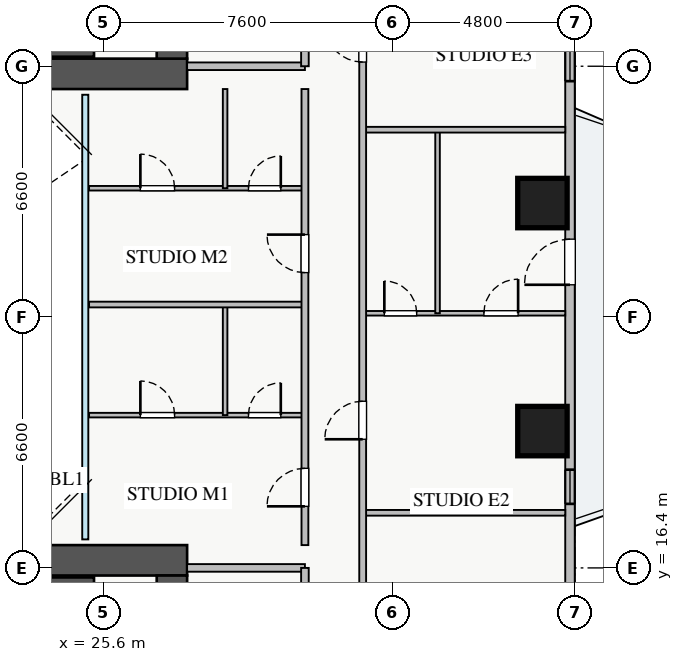
"""IFC4 building model, lengths in metres.
Left out: names, types, materials, properties, quantities, classifications, styles, units other than length and angle.
Written with IfcOpenShell. Run it as: python <this file> out.ifc"""

import sys

from ifc_helpers import new_model, si_unit, direction, frame, frame_2d, origin, origin_2d, place, context, subcontext, project, spatial, rectangle, extrude, source, transform, mapped, element, fill, save


model = new_model("IFC4")
c1 = context("Model", 3, precision=1e-05, world=origin(), true_north=direction((0.0, 1.0)))
c2 = subcontext(c1, "Body", "Model", "MODEL_VIEW")
j1 = project(units=[si_unit("LENGTHUNIT", "METRE"), si_unit("PLANEANGLEUNIT", "RADIAN")], contexts=[c1])
p1 = place(None, origin())
s1 = spatial("IfcSite", under=j1, at=p1, CompositionType="ELEMENT")
p2 = place(p1, origin())
s2 = spatial("IfcBuilding", under=s1, at=p2, CompositionType="ELEMENT")
p3 = place(p2, frame((0.0, 0.0, 79.5)))
s3 = spatial("IfcBuildingStorey", under=s2, at=p3, CompositionType="ELEMENT", Elevation=79.5)
for number, where, z_axis, x_axis in (
    (1, (18.2, 29.95, 0.0), (0.0, 0.0, 1.0), (1.0, 0.0, 0.0)),
    (2, (18.2, 16.05, 0.0), (0.0, 0.0, 1.0), (1.0, 0.0, 0.0)),
):
    element("IfcWall", number, at=place(p3, frame(where, z_axis=z_axis, x_axis=x_axis)), inside=s3, PredefinedType="SHEAR", context=c2, shape_type="SweptSolid", body=[
        extrude(rectangle(XDim=7.15, YDim=0.2, at=frame_2d((3.575, 0.0))), origin(), (0.0, 0.0, 1.0), 3.25),
    ])
p4 = place(p3, frame((10.2, 29.4, 0.0), z_axis=(0.0, 0.0, 1.0), x_axis=(1.0, 0.0, 0.0)))
e3 = element("IfcWall", 3, at=p4, inside=s3, PredefinedType="SHEAR", context=c2, shape_type="SweptSolid", body=[
    extrude(rectangle(XDim=17.6, YDim=0.8, at=frame_2d((8.8, 0.0))), origin(), (0.0, 0.0, 1.0), 3.25),
])
p5 = place(p3, frame((27.4, 29.8, 0.0), z_axis=(0.0, 0.0, 1.0), x_axis=(0.0, 1.0, 0.0)))
e4 = element("IfcWall", 4, at=p5, inside=s3, PredefinedType="SHEAR", context=c2, shape_type="SweptSolid", body=[
    extrude(rectangle(XDim=5.6, YDim=0.8, at=frame_2d((2.8, 0.0))), origin(), (0.0, 0.0, 1.0), 3.25),
])
p6 = place(p5, frame((1.1, 0.0, 0.0)))
e5 = element("IfcOpeningElement", 5, at=p6, cuts=e4, PredefinedType="OPENING", context=c2, shape_type="SweptSolid", body=[
    extrude(rectangle(XDim=1.3, YDim=2.05, at=frame_2d((0.65, 1.025))), frame((0.0, 0.41, 0.0), z_axis=(0.0, -1.0, 0.0), x_axis=(1.0, 0.0, 0.0)), (0.0, 0.0, 1.0), 0.82),
])
p7 = place(p3, frame((10.2, 16.6, 0.0), z_axis=(0.0, 0.0, 1.0), x_axis=(1.0, 0.0, 0.0)))
e6 = element("IfcWall", 6, at=p7, inside=s3, PredefinedType="SHEAR", context=c2, shape_type="SweptSolid", body=[
    extrude(rectangle(XDim=17.6, YDim=0.8, at=frame_2d((8.8, 0.0))), origin(), (0.0, 0.0, 1.0), 3.25),
])
p8 = place(p3, frame((27.4, 10.6, 0.0), z_axis=(0.0, 0.0, 1.0), x_axis=(0.0, 1.0, 0.0)))
e7 = element("IfcWall", 7, at=p8, inside=s3, PredefinedType="SHEAR", context=c2, shape_type="SweptSolid", body=[
    extrude(rectangle(XDim=5.6, YDim=0.8, at=frame_2d((2.8, 0.0))), origin(), (0.0, 0.0, 1.0), 3.25),
])
p9 = place(p8, frame((2.1, 0.0, 0.0)))
e8 = element("IfcOpeningElement", 8, at=p9, cuts=e7, PredefinedType="OPENING", context=c2, shape_type="SweptSolid", body=[
    extrude(rectangle(XDim=1.3, YDim=2.05, at=frame_2d((0.65, 1.025))), frame((0.0, 0.41, 0.0), z_axis=(0.0, -1.0, 0.0), x_axis=(1.0, 0.0, 0.0)), (0.0, 0.0, 1.0), 0.82),
])
m1 = source(origin(), c2, "Body", "SweptSolid", [
    extrude(rectangle(XDim=1.3, YDim=1.3, at=origin_2d()), origin(), (0.0, 0.0, 1.0), 3.25),
])
for number, where, z_axis, x_axis in (
    (9, (37.15, 20.0, 0.0), (0.0, 0.0, 1.0), (1.0, 0.0, 0.0)),
    (10, (37.15, 26.0, 0.0), (0.0, 0.0, 1.0), (1.0, 0.0, 0.0)),
):
    element("IfcColumn", number, at=place(p3, frame(where, z_axis=z_axis, x_axis=x_axis)), inside=s3, PredefinedType="COLUMN", context=c2, shape_type="MappedRepresentation", body=[
        mapped(m1, transform((0.0, 0.0, 0.0), x_axis=(1.0, 0.0, 0.0), y_axis=(0.0, 1.0, 0.0), z_axis=(0.0, 0.0, 1.0), scale=1.0)),
    ])
p10 = place(p3, frame((37.875, 9.45, 0.0), z_axis=(0.0, 0.0, 1.0), x_axis=(0.0, 1.0, 0.0)))
e11 = element("IfcWall", 11, at=p10, inside=s3, PredefinedType="STANDARD", context=c2, shape_type="SweptSolid", body=[
    extrude(rectangle(XDim=27.1, YDim=0.25, at=frame_2d((13.55, 0.0))), origin(), (0.0, 0.0, 1.0), 2.61),
])
p11 = place(p10, frame((14.4, 0.0, 0.0)))
e12 = element("IfcOpeningElement", 12, at=p11, cuts=e11, PredefinedType="OPENING", context=c2, shape_type="SweptSolid", body=[
    extrude(rectangle(XDim=1.2, YDim=2.1, at=frame_2d((0.6, 1.05))), frame((0.0, 0.135, 0.0), z_axis=(0.0, -1.0, 0.0), x_axis=(1.0, 0.0, 0.0)), (0.0, 0.0, 1.0), 0.27),
])
p12 = place(p10, frame((2.188, 0.0, 0.9)))
e13 = element("IfcOpeningElement", 13, at=p12, cuts=e11, PredefinedType="OPENING", context=c2, shape_type="SweptSolid", body=[
    extrude(rectangle(XDim=2.4, YDim=1.48, at=frame_2d((1.2, 0.74))), frame((0.0, 0.135, 0.0), z_axis=(0.0, -1.0, 0.0), x_axis=(1.0, 0.0, 0.0)), (0.0, 0.0, 1.0), 0.27),
])
p13 = place(p10, frame((23.788, 0.0, 0.9)))
e14 = element("IfcOpeningElement", 14, at=p13, cuts=e11, PredefinedType="OPENING", context=c2, shape_type="SweptSolid", body=[
    extrude(rectangle(XDim=1.8, YDim=1.5, at=frame_2d((0.9, 0.75))), frame((0.0, 0.135, 0.0), z_axis=(0.0, -1.0, 0.0), x_axis=(1.0, 0.0, 0.0)), (0.0, 0.0, 1.0), 0.27),
])
p14 = place(p10, frame((19.758, 0.0, 0.9)))
e15 = element("IfcOpeningElement", 15, at=p14, cuts=e11, PredefinedType="OPENING", context=c2, shape_type="SweptSolid", body=[
    extrude(rectangle(XDim=2.4, YDim=1.5, at=frame_2d((1.2, 0.75))), frame((0.0, 0.135, 0.0), z_axis=(0.0, -1.0, 0.0), x_axis=(1.0, 0.0, 0.0)), (0.0, 0.0, 1.0), 0.27),
])
p15 = place(p10, frame((8.635, 0.0, 0.9)))
e16 = element("IfcOpeningElement", 16, at=p15, cuts=e11, PredefinedType="OPENING", context=c2, shape_type="SweptSolid", body=[
    extrude(rectangle(XDim=0.9, YDim=1.2, at=frame_2d((0.45, 0.6))), frame((0.0, 0.135, 0.0), z_axis=(0.0, -1.0, 0.0), x_axis=(1.0, 0.0, 0.0)), (0.0, 0.0, 1.0), 0.27),
])
p16 = place(p3, frame((27.8, 29.6, 0.0), z_axis=(0.0, 0.0, 1.0), x_axis=(1.0, 0.0, 0.0)))
e17 = element("IfcWall", 17, at=p16, inside=s3, PredefinedType="PARTITIONING", context=c2, shape_type="SweptSolid", body=[
    extrude(rectangle(XDim=3.1, YDim=0.2, at=frame_2d((1.55, 0.0))), origin(), (0.0, 0.0, 1.0), 3.07),
])
p17 = place(p3, frame((30.9, 29.6, 0.0), z_axis=(0.0, 0.0, 1.0), x_axis=(0.0, 1.0, 0.0)))
e18 = element("IfcWall", 18, at=p17, inside=s3, PredefinedType="PARTITIONING", context=c2, shape_type="SweptSolid", body=[
    extrude(rectangle(XDim=3.9, YDim=0.2, at=frame_2d((1.95, 0.0))), origin(), (0.0, 0.0, 1.0), 3.07),
])
p18 = place(p17, frame((1.4, 0.0, 0.0)))
e19 = element("IfcOpeningElement", 19, at=p18, cuts=e18, PredefinedType="OPENING", context=c2, shape_type="SweptSolid", body=[
    extrude(rectangle(XDim=1.1, YDim=2.05, at=frame_2d((0.55, 1.025))), frame((0.0, 0.11, 0.0), z_axis=(0.0, -1.0, 0.0), x_axis=(1.0, 0.0, 0.0)), (0.0, 0.0, 1.0), 0.22),
])
p19 = place(p3, frame((27.8, 16.4, 0.0), z_axis=(0.0, 0.0, 1.0), x_axis=(1.0, 0.0, 0.0)))
e20 = element("IfcWall", 20, at=p19, inside=s3, PredefinedType="PARTITIONING", context=c2, shape_type="SweptSolid", body=[
    extrude(rectangle(XDim=3.1, YDim=0.2, at=frame_2d((1.55, 0.0))), origin(), (0.0, 0.0, 1.0), 3.07),
])
p20 = place(p3, frame((30.9, 12.5, 0.0), z_axis=(0.0, 0.0, 1.0), x_axis=(0.0, 1.0, 0.0)))
e21 = element("IfcWall", 21, at=p20, inside=s3, PredefinedType="PARTITIONING", context=c2, shape_type="SweptSolid", body=[
    extrude(rectangle(XDim=3.9, YDim=0.2, at=frame_2d((1.95, 0.0))), origin(), (0.0, 0.0, 1.0), 3.07),
])
p21 = place(p20, frame((1.4, 0.0, 0.0)))
e22 = element("IfcOpeningElement", 22, at=p21, cuts=e21, PredefinedType="OPENING", context=c2, shape_type="SweptSolid", body=[
    extrude(rectangle(XDim=1.1, YDim=2.05, at=frame_2d((0.55, 1.025))), frame((0.0, 0.11, 0.0), z_axis=(0.0, -1.0, 0.0), x_axis=(1.0, 0.0, 0.0)), (0.0, 0.0, 1.0), 0.22),
])
p22 = place(p3, frame((32.42, 23.1, 0.0), z_axis=(0.0, 0.0, 1.0), x_axis=(1.0, 0.0, 0.0)))
e23 = element("IfcWall", 23, at=p22, inside=s3, PredefinedType="PLUMBINGWALL", context=c2, shape_type="SweptSolid", body=[
    extrude(rectangle(XDim=5.33, YDim=0.12, at=frame_2d((2.665, 0.0))), origin(), (0.0, 0.0, 1.0), 3.07),
])
p23 = place(p22, frame((0.57, 0.0, 0.0)))
e24 = element("IfcOpeningElement", 24, at=p23, cuts=e23, PredefinedType="OPENING", context=c2, shape_type="SweptSolid", body=[
    extrude(rectangle(XDim=0.85, YDim=2.05, at=frame_2d((0.425, 1.025))), frame((0.0, 0.07, 0.0), z_axis=(0.0, -1.0, 0.0), x_axis=(1.0, 0.0, 0.0)), (0.0, 0.0, 1.0), 0.14),
])
p24 = place(p22, frame((3.19, 0.0, 0.0)))
e25 = element("IfcOpeningElement", 25, at=p24, cuts=e23, PredefinedType="OPENING", context=c2, shape_type="SweptSolid", body=[
    extrude(rectangle(XDim=0.9, YDim=2.05, at=frame_2d((0.45, 1.025))), frame((0.0, 0.07, 0.0), z_axis=(0.0, -1.0, 0.0), x_axis=(1.0, 0.0, 0.0)), (0.0, 0.0, 1.0), 0.14),
])
p25 = place(p3, frame((34.39, 23.1, 0.0), z_axis=(0.0, 0.0, 1.0), x_axis=(0.0, 1.0, 0.0)))
e26 = element("IfcWall", 26, at=p25, inside=s3, PredefinedType="PLUMBINGWALL", context=c2, shape_type="SweptSolid", body=[
    extrude(rectangle(XDim=4.83, YDim=0.12, at=frame_2d((2.415, 0.0))), origin(), (0.0, 0.0, 1.0), 3.07),
])
p26 = place(p3, frame((32.42, 17.85, 0.0), z_axis=(0.0, 0.0, 1.0), x_axis=(1.0, 0.0, 0.0)))
e27 = element("IfcWall", 27, at=p26, inside=s3, PredefinedType="PARTITIONING", context=c2, shape_type="SweptSolid", body=[
    extrude(rectangle(XDim=5.33, YDim=0.15, at=frame_2d((2.665, 0.0))), origin(), (0.0, 0.0, 1.0), 3.07),
])
p27 = place(p3, frame((32.42, 27.93, 0.0), z_axis=(0.0, 0.0, 1.0), x_axis=(1.0, 0.0, 0.0)))
e28 = element("IfcWall", 28, at=p27, inside=s3, PredefinedType="PARTITIONING", context=c2, shape_type="SweptSolid", body=[
    extrude(rectangle(XDim=5.33, YDim=0.15, at=frame_2d((2.665, 0.0))), origin(), (0.0, 0.0, 1.0), 2.765),
])
p28 = place(p3, frame((32.42, 7.21, 0.0), z_axis=(0.0, 0.0, 1.0), x_axis=(0.0, 1.0, 0.0)))
e29 = element("IfcWall", 29, at=p28, inside=s3, PredefinedType="PARTITIONING", context=c2, shape_type="SweptSolid", body=[
    extrude(rectangle(XDim=31.23, YDim=0.18, at=frame_2d((15.615, 0.0))), origin(), (0.0, 0.0, 1.0), 2.821),
])
p29 = place(p28, frame((30.09, 0.0, 0.0)))
e30 = element("IfcOpeningElement", 30, at=p29, cuts=e29, PredefinedType="OPENING", context=c2, shape_type="SweptSolid", body=[
    extrude(rectangle(XDim=0.9, YDim=2.05, at=frame_2d((0.45, 1.025))), frame((0.0, 0.1, 0.0), z_axis=(0.0, -1.0, 0.0), x_axis=(1.0, 0.0, 0.0)), (0.0, 0.0, 1.0), 0.2),
])
p30 = place(p28, frame((0.415, 0.0, 0.0)))
e31 = element("IfcOpeningElement", 31, at=p30, cuts=e29, PredefinedType="OPENING", context=c2, shape_type="SweptSolid", body=[
    extrude(rectangle(XDim=0.9, YDim=2.05, at=frame_2d((0.45, 1.025))), frame((0.0, 0.1, 0.0), z_axis=(0.0, -1.0, 0.0), x_axis=(1.0, 0.0, 0.0)), (0.0, 0.0, 1.0), 0.2),
])
p31 = place(p28, frame((5.675, 0.0, 0.0)))
e32 = element("IfcOpeningElement", 32, at=p31, cuts=e29, PredefinedType="OPENING", context=c2, shape_type="SweptSolid", body=[
    extrude(rectangle(XDim=1.0, YDim=2.05, at=frame_2d((0.5, 1.025))), frame((0.0, 0.1, 0.0), z_axis=(0.0, -1.0, 0.0), x_axis=(1.0, 0.0, 0.0)), (0.0, 0.0, 1.0), 0.2),
])
p32 = place(p28, frame((12.575, 0.0, 0.0)))
e33 = element("IfcOpeningElement", 33, at=p32, cuts=e29, PredefinedType="OPENING", context=c2, shape_type="SweptSolid", body=[
    extrude(rectangle(XDim=1.0, YDim=2.05, at=frame_2d((0.5, 1.025))), frame((0.0, 0.1, 0.0), z_axis=(0.0, -1.0, 0.0), x_axis=(1.0, 0.0, 0.0)), (0.0, 0.0, 1.0), 0.2),
])
p33 = place(p28, frame((22.5, 0.0, 0.0)))
e34 = element("IfcOpeningElement", 34, at=p33, cuts=e29, PredefinedType="OPENING", context=c2, shape_type="SweptSolid", body=[
    extrude(rectangle(XDim=1.0, YDim=2.05, at=frame_2d((0.5, 1.025))), frame((0.0, 0.1, 0.0), z_axis=(0.0, -1.0, 0.0), x_axis=(1.0, 0.0, 0.0)), (0.0, 0.0, 1.0), 0.2),
])
p34 = place(p3, frame((25.22, 20.42, 0.0), z_axis=(0.0, 0.0, 1.0), x_axis=(1.0, 0.0, 0.0)))
e35 = element("IfcWall", 35, at=p34, inside=s3, PredefinedType="PLUMBINGWALL", context=c2, shape_type="SweptSolid", body=[
    extrude(rectangle(XDim=5.68, YDim=0.12, at=frame_2d((2.84, 0.0))), origin(), (0.0, 0.0, 1.0), 3.07),
])
p35 = place(p34, frame((1.35, 0.0, 0.0)))
e36 = element("IfcOpeningElement", 36, at=p35, cuts=e35, PredefinedType="OPENING", context=c2, shape_type="SweptSolid", body=[
    extrude(rectangle(XDim=0.9, YDim=2.05, at=frame_2d((0.45, 1.025))), frame((0.0, 0.07, 0.0), z_axis=(0.0, -1.0, 0.0), x_axis=(1.0, 0.0, 0.0)), (0.0, 0.0, 1.0), 0.14),
])
p36 = place(p34, frame((4.195, 0.0, 0.0)))
e37 = element("IfcOpeningElement", 37, at=p36, cuts=e35, PredefinedType="OPENING", context=c2, shape_type="SweptSolid", body=[
    extrude(rectangle(XDim=0.85, YDim=2.05, at=frame_2d((0.425, 1.025))), frame((0.0, 0.07, 0.0), z_axis=(0.0, -1.0, 0.0), x_axis=(1.0, 0.0, 0.0)), (0.0, 0.0, 1.0), 0.14),
])
p37 = place(p3, frame((28.8, 20.42, 0.0), z_axis=(0.0, 0.0, 1.0), x_axis=(0.0, 1.0, 0.0)))
e38 = element("IfcWall", 38, at=p37, inside=s3, PredefinedType="PLUMBINGWALL", context=c2, shape_type="SweptSolid", body=[
    extrude(rectangle(XDim=2.91, YDim=0.12, at=frame_2d((1.455, 0.0))), origin(), (0.0, 0.0, 1.0), 3.07),
])
p38 = place(p3, frame((25.22, 26.39, 0.0), z_axis=(0.0, 0.0, 1.0), x_axis=(1.0, 0.0, 0.0)))
e39 = element("IfcWall", 39, at=p38, inside=s3, PredefinedType="PLUMBINGWALL", context=c2, shape_type="SweptSolid", body=[
    extrude(rectangle(XDim=5.68, YDim=0.12, at=frame_2d((2.84, 0.0))), origin(), (0.0, 0.0, 1.0), 3.07),
])
p39 = place(p38, frame((1.35, 0.0, 0.0)))
e40 = element("IfcOpeningElement", 40, at=p39, cuts=e39, PredefinedType="OPENING", context=c2, shape_type="SweptSolid", body=[
    extrude(rectangle(XDim=0.9, YDim=2.05, at=frame_2d((0.45, 1.025))), frame((0.0, 0.07, 0.0), z_axis=(0.0, -1.0, 0.0), x_axis=(1.0, 0.0, 0.0)), (0.0, 0.0, 1.0), 0.14),
])
p40 = place(p38, frame((4.195, 0.0, 0.0)))
e41 = element("IfcOpeningElement", 41, at=p40, cuts=e39, PredefinedType="OPENING", context=c2, shape_type="SweptSolid", body=[
    extrude(rectangle(XDim=0.85, YDim=2.05, at=frame_2d((0.425, 1.025))), frame((0.0, 0.07, 0.0), z_axis=(0.0, -1.0, 0.0), x_axis=(1.0, 0.0, 0.0)), (0.0, 0.0, 1.0), 0.14),
])
p41 = place(p3, frame((28.8, 26.39, 0.0), z_axis=(0.0, 0.0, 1.0), x_axis=(0.0, 1.0, 0.0)))
e42 = element("IfcWall", 42, at=p41, inside=s3, PredefinedType="PLUMBINGWALL", context=c2, shape_type="SweptSolid", body=[
    extrude(rectangle(XDim=2.61, YDim=0.12, at=frame_2d((1.305, 0.0))), origin(), (0.0, 0.0, 1.0), 3.07),
])
p42 = place(p3, frame((25.22, 23.33, 0.0), z_axis=(0.0, 0.0, 1.0), x_axis=(1.0, 0.0, 0.0)))
e43 = element("IfcWall", 43, at=p42, inside=s3, PredefinedType="PARTITIONING", context=c2, shape_type="SweptSolid", body=[
    extrude(rectangle(XDim=5.68, YDim=0.15, at=frame_2d((2.84, 0.0))), origin(), (0.0, 0.0, 1.0), 3.07),
])
p43 = place(p3, frame((30.9, 17.0, 0.0), z_axis=(0.0, 0.0, 1.0), x_axis=(0.0, 1.0, 0.0)))
e44 = element("IfcWall", 44, at=p43, inside=s3, PredefinedType="PARTITIONING", context=c2, shape_type="SweptSolid", body=[
    extrude(rectangle(XDim=12.0, YDim=0.18, at=frame_2d((6.0, 0.0))), origin(), (0.0, 0.0, 1.0), 3.07),
])
p44 = place(p43, frame((1.02, 0.0, 0.0)))
e45 = element("IfcOpeningElement", 45, at=p44, cuts=e44, PredefinedType="OPENING", context=c2, shape_type="SweptSolid", body=[
    extrude(rectangle(XDim=1.0, YDim=2.05, at=frame_2d((0.5, 1.025))), frame((0.0, 0.1, 0.0), z_axis=(0.0, -1.0, 0.0), x_axis=(1.0, 0.0, 0.0)), (0.0, 0.0, 1.0), 0.2),
])
p45 = place(p43, frame((7.17, 0.0, 0.0)))
e46 = element("IfcOpeningElement", 46, at=p45, cuts=e44, PredefinedType="OPENING", context=c2, shape_type="SweptSolid", body=[
    extrude(rectangle(XDim=1.0, YDim=2.05, at=frame_2d((0.5, 1.025))), frame((0.0, 0.1, 0.0), z_axis=(0.0, -1.0, 0.0), x_axis=(1.0, 0.0, 0.0)), (0.0, 0.0, 1.0), 0.2),
])
m2 = source(origin(), c2, "Body", "SweptSolid", [
    extrude(rectangle(XDim=1.2, YDim=2.1, at=frame_2d((0.6, 1.05))), frame((0.0, 0.025, 0.0), z_axis=(0.0, -1.0, 0.0), x_axis=(1.0, 0.0, 0.0)), (0.0, 0.0, 1.0), 0.05),
])
p46 = place(p11, origin())
e47 = element("IfcDoor", 47, at=p46, inside=s3, OperationType="SINGLE_SWING_LEFT", PredefinedType="DOOR", context=c2, shape_type="MappedRepresentation", body=[
    mapped(m2, transform((0.0, 0.0, 0.0), x_axis=(1.0, 0.0, 0.0), y_axis=(0.0, 1.0, 0.0), z_axis=(0.0, 0.0, 1.0), scale=1.0)),
])
fill(e12, e47)
m3 = source(origin(), c2, "Body", "SweptSolid", [
    extrude(rectangle(XDim=0.85, YDim=2.05, at=frame_2d((0.425, 1.025))), frame((0.0, 0.025, 0.0), z_axis=(0.0, -1.0, 0.0), x_axis=(1.0, 0.0, 0.0)), (0.0, 0.0, 1.0), 0.05),
])
p47 = place(p23, origin())
e48 = element("IfcDoor", 48, at=p47, inside=s3, OperationType="SINGLE_SWING_LEFT", PredefinedType="DOOR", context=c2, shape_type="MappedRepresentation", body=[
    mapped(m3, transform((0.0, 0.0, 0.0), x_axis=(1.0, 0.0, 0.0), y_axis=(0.0, 1.0, 0.0), z_axis=(0.0, 0.0, 1.0), scale=1.0)),
])
fill(e24, e48)
m4 = source(origin(), c2, "Body", "SweptSolid", [
    extrude(rectangle(XDim=0.9, YDim=2.05, at=frame_2d((0.45, 1.025))), frame((0.0, 0.025, 0.0), z_axis=(0.0, -1.0, 0.0), x_axis=(1.0, 0.0, 0.0)), (0.0, 0.0, 1.0), 0.05),
])
p48 = place(p24, origin())
e49 = element("IfcDoor", 49, at=p48, inside=s3, OperationType="SINGLE_SWING_RIGHT", PredefinedType="DOOR", context=c2, shape_type="MappedRepresentation", body=[
    mapped(m4, transform((0.0, 0.0, 0.0), x_axis=(1.0, 0.0, 0.0), y_axis=(0.0, 1.0, 0.0), z_axis=(0.0, 0.0, 1.0), scale=1.0)),
])
fill(e25, e49)
m5 = source(origin(), c2, "Body", "SweptSolid", [
    extrude(rectangle(XDim=1.0, YDim=2.05, at=frame_2d((0.5, 1.025))), frame((0.0, 0.025, 0.0), z_axis=(0.0, -1.0, 0.0), x_axis=(1.0, 0.0, 0.0)), (0.0, 0.0, 1.0), 0.05),
])
p49 = place(p32, origin())
e50 = element("IfcDoor", 50, at=p49, inside=s3, OperationType="SINGLE_SWING_LEFT", PredefinedType="DOOR", context=c2, shape_type="MappedRepresentation", body=[
    mapped(m5, transform((0.0, 0.0, 0.0), x_axis=(1.0, 0.0, 0.0), y_axis=(0.0, 1.0, 0.0), z_axis=(0.0, 0.0, 1.0), scale=1.0)),
])
fill(e33, e50)
p50 = place(p33, origin())
e51 = element("IfcDoor", 51, at=p50, inside=s3, OperationType="SINGLE_SWING_RIGHT", PredefinedType="DOOR", context=c2, shape_type="MappedRepresentation", body=[
    mapped(m5, transform((0.0, 0.0, 0.0), x_axis=(1.0, 0.0, 0.0), y_axis=(0.0, 1.0, 0.0), z_axis=(0.0, 0.0, 1.0), scale=1.0)),
])
fill(e34, e51)
p51 = place(p35, origin())
e52 = element("IfcDoor", 52, at=p51, inside=s3, OperationType="SINGLE_SWING_LEFT", PredefinedType="DOOR", context=c2, shape_type="MappedRepresentation", body=[
    mapped(m4, transform((0.0, 0.0, 0.0), x_axis=(1.0, 0.0, 0.0), y_axis=(0.0, 1.0, 0.0), z_axis=(0.0, 0.0, 1.0), scale=1.0)),
])
fill(e36, e52)
p52 = place(p36, origin())
e53 = element("IfcDoor", 53, at=p52, inside=s3, OperationType="SINGLE_SWING_RIGHT", PredefinedType="DOOR", context=c2, shape_type="MappedRepresentation", body=[
    mapped(m3, transform((0.0, 0.0, 0.0), x_axis=(1.0, 0.0, 0.0), y_axis=(0.0, 1.0, 0.0), z_axis=(0.0, 0.0, 1.0), scale=1.0)),
])
fill(e37, e53)
p53 = place(p39, origin())
e54 = element("IfcDoor", 54, at=p53, inside=s3, OperationType="SINGLE_SWING_LEFT", PredefinedType="DOOR", context=c2, shape_type="MappedRepresentation", body=[
    mapped(m4, transform((0.0, 0.0, 0.0), x_axis=(1.0, 0.0, 0.0), y_axis=(0.0, 1.0, 0.0), z_axis=(0.0, 0.0, 1.0), scale=1.0)),
])
fill(e40, e54)
p54 = place(p40, origin())
e55 = element("IfcDoor", 55, at=p54, inside=s3, OperationType="SINGLE_SWING_RIGHT", PredefinedType="DOOR", context=c2, shape_type="MappedRepresentation", body=[
    mapped(m3, transform((0.0, 0.0, 0.0), x_axis=(1.0, 0.0, 0.0), y_axis=(0.0, 1.0, 0.0), z_axis=(0.0, 0.0, 1.0), scale=1.0)),
])
fill(e41, e55)
p55 = place(p44, origin())
e56 = element("IfcDoor", 56, at=p55, inside=s3, OperationType="SINGLE_SWING_LEFT", PredefinedType="DOOR", context=c2, shape_type="MappedRepresentation", body=[
    mapped(m5, transform((0.0, 0.0, 0.0), x_axis=(1.0, 0.0, 0.0), y_axis=(0.0, 1.0, 0.0), z_axis=(0.0, 0.0, 1.0), scale=1.0)),
])
fill(e45, e56)
p56 = place(p45, origin())
e57 = element("IfcDoor", 57, at=p56, inside=s3, OperationType="SINGLE_SWING_RIGHT", PredefinedType="DOOR", context=c2, shape_type="MappedRepresentation", body=[
    mapped(m5, transform((0.0, 0.0, 0.0), x_axis=(1.0, 0.0, 0.0), y_axis=(0.0, 1.0, 0.0), z_axis=(0.0, 0.0, 1.0), scale=1.0)),
])
fill(e46, e57)
m6 = source(origin(), c2, "Body", "SweptSolid", [
    extrude(rectangle(XDim=2.4, YDim=1.5, at=frame_2d((1.2, 0.75))), frame((0.0, 0.03, 0.0), z_axis=(0.0, -1.0, 0.0), x_axis=(1.0, 0.0, 0.0)), (0.0, 0.0, 1.0), 0.06),
])
p57 = place(p14, origin())
e58 = element("IfcWindow", 58, at=p57, inside=s3, PartitioningType="TRIPLE_PANEL_VERTICAL", PredefinedType="WINDOW", context=c2, shape_type="MappedRepresentation", body=[
    mapped(m6, transform((0.0, 0.0, 0.0), x_axis=(1.0, 0.0, 0.0), y_axis=(0.0, 1.0, 0.0), z_axis=(0.0, 0.0, 1.0), scale=1.0)),
])
fill(e15, e58)
m7 = source(origin(), c2, "Body", "SweptSolid", [
    extrude(rectangle(XDim=0.9, YDim=1.2, at=frame_2d((0.45, 0.6))), frame((0.0, 0.03, 0.0), z_axis=(0.0, -1.0, 0.0), x_axis=(1.0, 0.0, 0.0)), (0.0, 0.0, 1.0), 0.06),
])
p58 = place(p15, origin())
e59 = element("IfcWindow", 59, at=p58, inside=s3, PartitioningType="SINGLE_PANEL", PredefinedType="WINDOW", context=c2, shape_type="MappedRepresentation", body=[
    mapped(m7, transform((0.0, 0.0, 0.0), x_axis=(1.0, 0.0, 0.0), y_axis=(0.0, 1.0, 0.0), z_axis=(0.0, 0.0, 1.0), scale=1.0)),
])
fill(e16, e59)
save(model, sys.argv[1])
